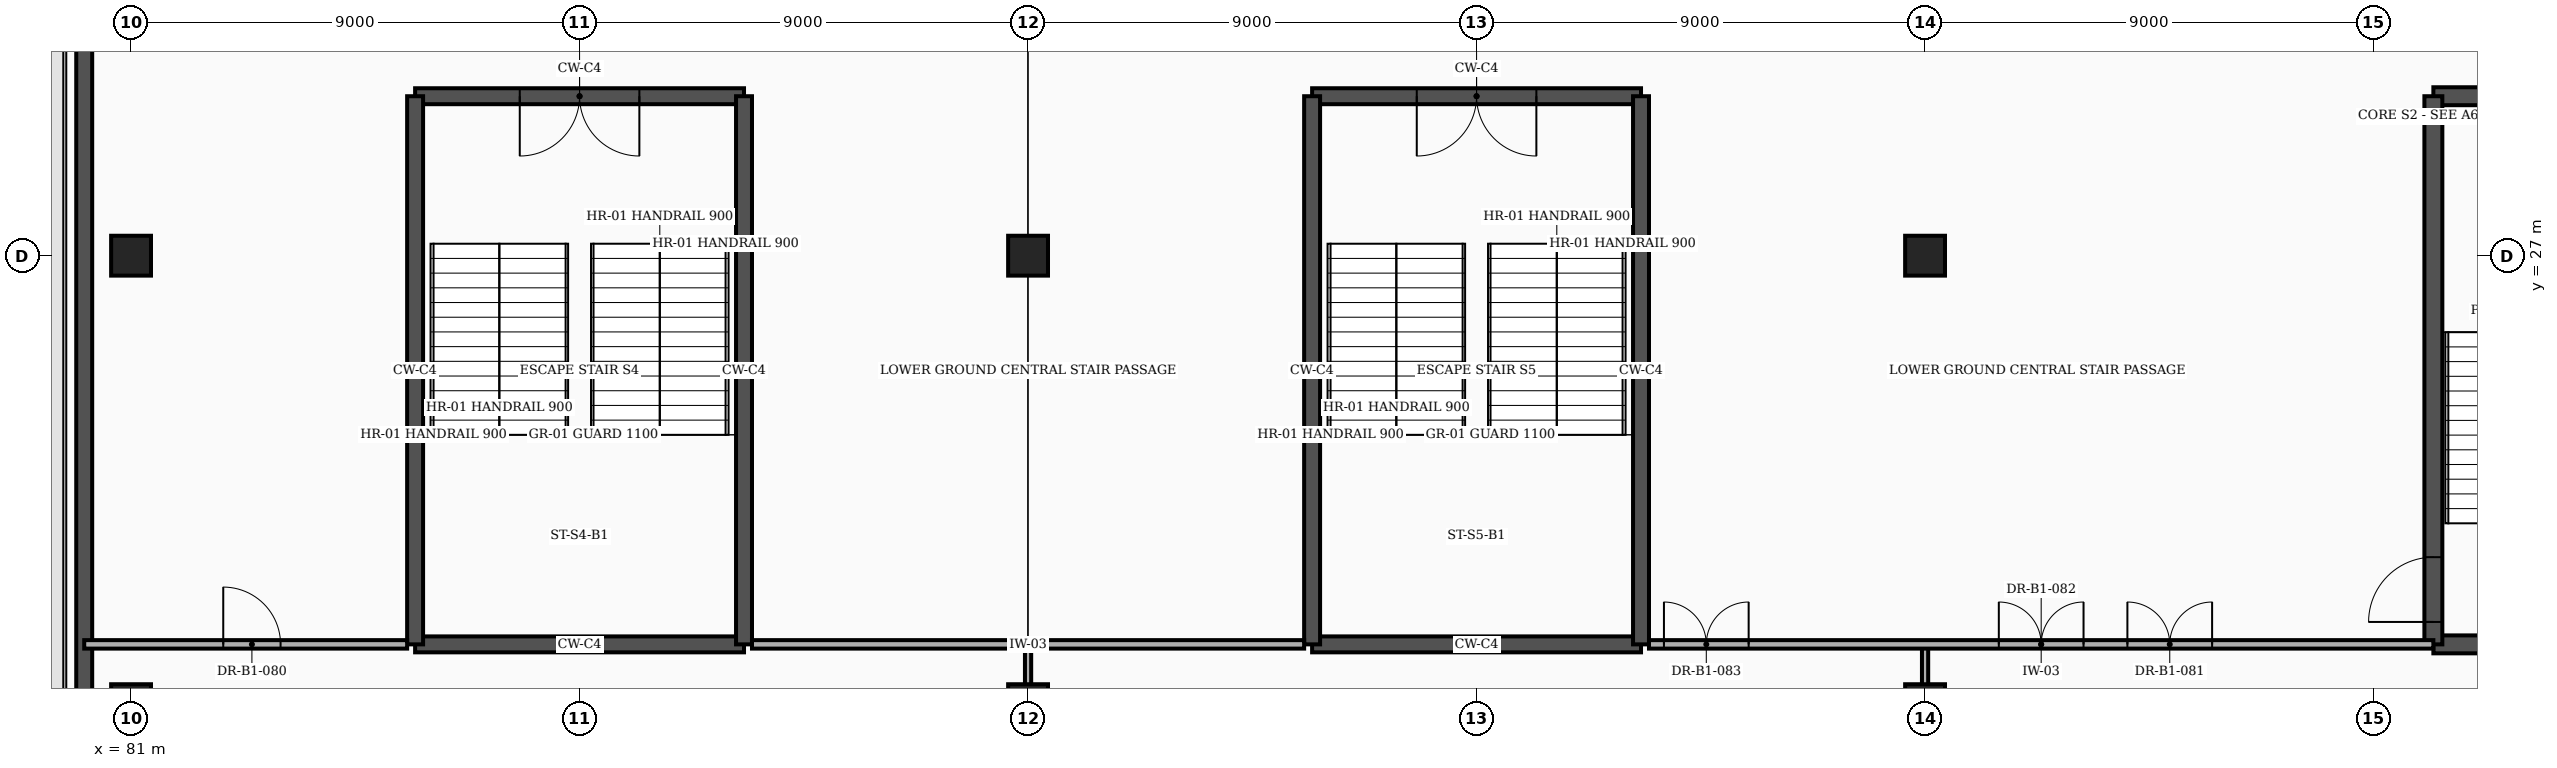
"""IFC4 building model, lengths in metres.
Left out: names, types, materials, properties, quantities, classifications, styles, units other than length and angle.
Written with IfcOpenShell. Run it as: python <this file> out.ifc"""

import sys

from ifc_helpers import new_model, si_unit, direction, frame, frame_2d, origin, origin_2d, place, context, subcontext, project, spatial, rectangle, extrude, element, fill, save


model = new_model("IFC4")
c1 = context("Model", 3, precision=1e-05, world=origin(), true_north=direction((0.0, 1.0)))
c2 = subcontext(c1, "Body", "Model", "MODEL_VIEW")
j1 = project(units=[si_unit("LENGTHUNIT", "METRE"), si_unit("PLANEANGLEUNIT", "RADIAN")], contexts=[c1])
p1 = place(None, origin())
s1 = spatial("IfcSite", under=j1, at=p1, CompositionType="ELEMENT")
p2 = place(p1, origin())
s2 = spatial("IfcBuilding", under=s1, at=p2, CompositionType="ELEMENT")
p3 = place(p2, frame((0.0, 0.0, -4.5)))
s3 = spatial("IfcBuildingStorey", under=s2, at=p3, CompositionType="ELEMENT", Elevation=-4.5)
for number, where, z_axis, x_axis in (
    (1, (81.0, 18.0, -0.45), (0.0, 0.0, 1.0), (1.0, 0.0, 0.0)),
    (2, (81.0, 27.0, -0.45), (0.0, 0.0, 1.0), (1.0, 0.0, 0.0)),
    (3, (99.0, 18.0, -0.45), (0.0, 0.0, 1.0), (1.0, 0.0, 0.0)),
    (4, (99.0, 27.0, -0.45), (0.0, 0.0, 1.0), (1.0, 0.0, 0.0)),
    (5, (117.0, 18.0, -0.45), (0.0, 0.0, 1.0), (1.0, 0.0, 0.0)),
    (6, (117.0, 27.0, -0.45), (0.0, 0.0, 1.0), (1.0, 0.0, 0.0)),
):
    element("IfcColumn", number, at=place(p3, frame(where, z_axis=z_axis, x_axis=x_axis)), inside=s3, PredefinedType="COLUMN", context=c2, shape_type="SweptSolid", body=[
        extrude(rectangle(XDim=0.8, YDim=0.8, at=origin_2d()), origin(), (0.0, 0.0, 1.0), 4.95),
    ])
p4 = place(p3, frame((80.06, 1.34, 0.0), z_axis=(0.0, 0.0, 1.0), x_axis=(0.0, 1.0, 0.0)))
e7 = element("IfcWall", 7, at=p4, inside=s3, PredefinedType="SHEAR", context=c2, shape_type="SweptSolid", body=[
    extrude(rectangle(XDim=31.66, YDim=0.32, at=frame_2d((15.83, 0.0))), origin(), (0.0, 0.0, 1.0), 4.24),
])
p5 = place(p3, frame((127.2, 19.2, 0.0), z_axis=(0.0, 0.0, 1.0), x_axis=(1.0, 0.0, 0.0)))
e8 = element("IfcWall", 8, at=p5, inside=s3, PredefinedType="SHEAR", context=c2, shape_type="SweptSolid", body=[
    extrude(rectangle(XDim=6.6, YDim=0.36, at=frame_2d((3.3, 0.0))), origin(), (0.0, 0.0, 1.0), 4.24),
])
p6 = place(p3, frame((127.2, 30.2, 0.0), z_axis=(0.0, 0.0, 1.0), x_axis=(1.0, 0.0, 0.0)))
e9 = element("IfcWall", 9, at=p6, inside=s3, PredefinedType="SHEAR", context=c2, shape_type="SweptSolid", body=[
    extrude(rectangle(XDim=6.6, YDim=0.36, at=frame_2d((3.3, 0.0))), origin(), (0.0, 0.0, 1.0), 4.24),
])
p7 = place(p6, frame((4.45, 0.0, 0.0)))
e10 = element("IfcOpeningElement", 10, at=p7, cuts=e9, PredefinedType="OPENING", context=c2, shape_type="SweptSolid", body=[
    extrude(rectangle(XDim=1.6, YDim=2.3, at=frame_2d((0.8, 1.15))), frame((0.0, 0.192, 0.0), z_axis=(0.0, -1.0, 0.0), x_axis=(1.0, 0.0, 0.0)), (0.0, 0.0, 1.0), 0.384),
])
p8 = place(p3, frame((127.2, 19.2, 0.0), z_axis=(0.0, 0.0, 1.0), x_axis=(0.0, 1.0, 0.0)))
e11 = element("IfcWall", 11, at=p8, inside=s3, PredefinedType="SHEAR", context=c2, shape_type="SweptSolid", body=[
    extrude(rectangle(XDim=11.0, YDim=0.36, at=frame_2d((5.5, 0.0))), origin(), (0.0, 0.0, 1.0), 4.24),
])
p9 = place(p8, frame((0.45, 0.0, 0.0)))
e12 = element("IfcOpeningElement", 12, at=p9, cuts=e11, PredefinedType="OPENING", context=c2, shape_type="SweptSolid", body=[
    extrude(rectangle(XDim=1.3, YDim=2.2, at=frame_2d((0.65, 1.1))), frame((0.0, 0.192, 0.0), z_axis=(0.0, -1.0, 0.0), x_axis=(1.0, 0.0, 0.0)), (0.0, 0.0, 1.0), 0.384),
])
p10 = place(p3, frame((86.7, 19.2, 0.0), z_axis=(0.0, 0.0, 1.0), x_axis=(1.0, 0.0, 0.0)))
e13 = element("IfcWall", 13, at=p10, inside=s3, PredefinedType="SHEAR", context=c2, shape_type="SweptSolid", body=[
    extrude(rectangle(XDim=6.6, YDim=0.32, at=frame_2d((3.3, 0.0))), origin(), (0.0, 0.0, 1.0), 4.24),
])
p11 = place(p3, frame((86.7, 30.2, 0.0), z_axis=(0.0, 0.0, 1.0), x_axis=(1.0, 0.0, 0.0)))
e14 = element("IfcWall", 14, at=p11, inside=s3, PredefinedType="SHEAR", context=c2, shape_type="SweptSolid", body=[
    extrude(rectangle(XDim=6.6, YDim=0.32, at=frame_2d((3.3, 0.0))), origin(), (0.0, 0.0, 1.0), 4.24),
])
p12 = place(p11, frame((2.1, 0.0, 0.0)))
e15 = element("IfcOpeningElement", 15, at=p12, cuts=e14, PredefinedType="OPENING", context=c2, shape_type="SweptSolid", body=[
    extrude(rectangle(XDim=2.4, YDim=2.25, at=frame_2d((1.2, 1.125))), frame((0.0, 0.172, 0.0), z_axis=(0.0, -1.0, 0.0), x_axis=(1.0, 0.0, 0.0)), (0.0, 0.0, 1.0), 0.344),
])
for number, where, z_axis, x_axis in (
    (16, (86.7, 19.2, 0.0), (0.0, 0.0, 1.0), (0.0, 1.0, 0.0)),
    (17, (93.3, 19.2, 0.0), (0.0, 0.0, 1.0), (0.0, 1.0, 0.0)),
):
    element("IfcWall", number, at=place(p3, frame(where, z_axis=z_axis, x_axis=x_axis)), inside=s3, PredefinedType="SHEAR", context=c2, shape_type="SweptSolid", body=[
        extrude(rectangle(XDim=11.0, YDim=0.32, at=frame_2d((5.5, 0.0))), origin(), (0.0, 0.0, 1.0), 4.24),
    ])
p13 = place(p3, frame((104.7, 19.2, 0.0), z_axis=(0.0, 0.0, 1.0), x_axis=(1.0, 0.0, 0.0)))
e18 = element("IfcWall", 18, at=p13, inside=s3, PredefinedType="SHEAR", context=c2, shape_type="SweptSolid", body=[
    extrude(rectangle(XDim=6.6, YDim=0.32, at=frame_2d((3.3, 0.0))), origin(), (0.0, 0.0, 1.0), 4.24),
])
p14 = place(p3, frame((104.7, 30.2, 0.0), z_axis=(0.0, 0.0, 1.0), x_axis=(1.0, 0.0, 0.0)))
e19 = element("IfcWall", 19, at=p14, inside=s3, PredefinedType="SHEAR", context=c2, shape_type="SweptSolid", body=[
    extrude(rectangle(XDim=6.6, YDim=0.32, at=frame_2d((3.3, 0.0))), origin(), (0.0, 0.0, 1.0), 4.24),
])
p15 = place(p14, frame((2.1, 0.0, 0.0)))
e20 = element("IfcOpeningElement", 20, at=p15, cuts=e19, PredefinedType="OPENING", context=c2, shape_type="SweptSolid", body=[
    extrude(rectangle(XDim=2.4, YDim=2.25, at=frame_2d((1.2, 1.125))), frame((0.0, 0.172, 0.0), z_axis=(0.0, -1.0, 0.0), x_axis=(1.0, 0.0, 0.0)), (0.0, 0.0, 1.0), 0.344),
])
for number, where, z_axis, x_axis in (
    (21, (104.7, 19.2, 0.0), (0.0, 0.0, 1.0), (0.0, 1.0, 0.0)),
    (22, (111.3, 19.2, 0.0), (0.0, 0.0, 1.0), (0.0, 1.0, 0.0)),
):
    element("IfcWall", number, at=place(p3, frame(where, z_axis=z_axis, x_axis=x_axis)), inside=s3, PredefinedType="SHEAR", context=c2, shape_type="SweptSolid", body=[
        extrude(rectangle(XDim=11.0, YDim=0.32, at=frame_2d((5.5, 0.0))), origin(), (0.0, 0.0, 1.0), 4.24),
    ])
for number, where, z_axis, x_axis in (
    (23, (99.0, 0.21, 0.0), (0.0, 0.0, 1.0), (0.0, 1.0, 0.0)),
    (24, (117.0, 0.21, 0.0), (0.0, 0.0, 1.0), (0.0, 1.0, 0.0)),
):
    element("IfcWall", number, at=place(p3, frame(where, z_axis=z_axis, x_axis=x_axis)), inside=s3, PredefinedType="PARTITIONING", context=c2, shape_type="SweptSolid", body=[
        extrude(rectangle(XDim=18.99, YDim=0.125, at=frame_2d((9.495, 0.0))), origin(), (0.0, 0.0, 1.0), 3.628),
    ])
p16 = place(p3, frame((80.06, 19.2, 0.0), z_axis=(0.0, 0.0, 1.0), x_axis=(1.0, 0.0, 0.0)))
e25 = element("IfcWall", 25, at=p16, inside=s3, PredefinedType="PARTITIONING", context=c2, shape_type="SweptSolid", body=[
    extrude(rectangle(XDim=6.48, YDim=0.17, at=frame_2d((3.24, 0.0))), origin(), (0.0, 0.0, 1.0), 4.24),
])
p17 = place(p16, frame((2.79, 0.0, 0.0)))
e26 = element("IfcOpeningElement", 26, at=p17, cuts=e25, PredefinedType="OPENING", context=c2, shape_type="SweptSolid", body=[
    extrude(rectangle(XDim=1.15, YDim=2.15, at=frame_2d((0.575, 1.075))), frame((0.0, 0.097, 0.0), z_axis=(0.0, -1.0, 0.0), x_axis=(1.0, 0.0, 0.0)), (0.0, 0.0, 1.0), 0.194),
])
p18 = place(p3, frame((93.46, 19.2, 0.0), z_axis=(0.0, 0.0, 1.0), x_axis=(1.0, 0.0, 0.0)))
e27 = element("IfcWall", 27, at=p18, inside=s3, PredefinedType="PARTITIONING", context=c2, shape_type="SweptSolid", body=[
    extrude(rectangle(XDim=11.08, YDim=0.17, at=frame_2d((5.54, 0.0))), origin(), (0.0, 0.0, 1.0), 4.24),
])
p19 = place(p3, frame((111.46, 19.2, 0.0), z_axis=(0.0, 0.0, 1.0), x_axis=(1.0, 0.0, 0.0)))
e28 = element("IfcWall", 28, at=p19, inside=s3, PredefinedType="PARTITIONING", context=c2, shape_type="SweptSolid", body=[
    extrude(rectangle(XDim=15.74, YDim=0.17, at=frame_2d((7.87, 0.0))), origin(), (0.0, 0.0, 1.0), 4.24),
])
p20 = place(p19, frame((9.6, 0.0, 0.0)))
e29 = element("IfcOpeningElement", 29, at=p20, cuts=e28, PredefinedType="OPENING", context=c2, shape_type="SweptSolid", body=[
    extrude(rectangle(XDim=1.7, YDim=2.3, at=frame_2d((0.85, 1.15))), frame((0.0, 0.097, 0.0), z_axis=(0.0, -1.0, 0.0), x_axis=(1.0, 0.0, 0.0)), (0.0, 0.0, 1.0), 0.194),
])
p21 = place(p19, frame((7.02, 0.0, 0.0)))
e30 = element("IfcOpeningElement", 30, at=p21, cuts=e28, PredefinedType="OPENING", context=c2, shape_type="SweptSolid", body=[
    extrude(rectangle(XDim=1.7, YDim=2.3, at=frame_2d((0.85, 1.15))), frame((0.0, 0.097, 0.0), z_axis=(0.0, -1.0, 0.0), x_axis=(1.0, 0.0, 0.0)), (0.0, 0.0, 1.0), 0.194),
])
p22 = place(p19, frame((0.3, 0.0, 0.0)))
e31 = element("IfcOpeningElement", 31, at=p22, cuts=e28, PredefinedType="OPENING", context=c2, shape_type="SweptSolid", body=[
    extrude(rectangle(XDim=1.7, YDim=2.3, at=frame_2d((0.85, 1.15))), frame((0.0, 0.097, 0.0), z_axis=(0.0, -1.0, 0.0), x_axis=(1.0, 0.0, 0.0)), (0.0, 0.0, 1.0), 0.194),
])
p23 = place(p9, origin())
e32 = element("IfcDoor", 32, at=p23, inside=s3, OperationType="SINGLE_SWING_LEFT", PredefinedType="DOOR", context=c2, shape_type="SweptSolid", body=[
    extrude(rectangle(XDim=1.3, YDim=2.2, at=frame_2d((0.65, 1.1))), frame((0.0, 0.025, 0.0), z_axis=(0.0, -1.0, 0.0), x_axis=(1.0, 0.0, 0.0)), (0.0, 0.0, 1.0), 0.05),
])
fill(e12, e32)
p24 = place(p12, frame((2.4, 0.0, 0.0), z_axis=(0.0, 0.0, 1.0), x_axis=(-1.0, 0.0, 0.0)))
e33 = element("IfcDoor", 33, at=p24, inside=s3, OperationType="DOUBLE_DOOR_SINGLE_SWING", PredefinedType="DOOR", context=c2, shape_type="SweptSolid", body=[
    extrude(rectangle(XDim=2.4, YDim=2.25, at=frame_2d((1.2, 1.125))), frame((0.0, 0.025, 0.0), z_axis=(0.0, -1.0, 0.0), x_axis=(1.0, 0.0, 0.0)), (0.0, 0.0, 1.0), 0.05),
])
fill(e15, e33)
p25 = place(p15, frame((2.4, 0.0, 0.0), z_axis=(0.0, 0.0, 1.0), x_axis=(-1.0, 0.0, 0.0)))
e34 = element("IfcDoor", 34, at=p25, inside=s3, OperationType="DOUBLE_DOOR_SINGLE_SWING", PredefinedType="DOOR", context=c2, shape_type="SweptSolid", body=[
    extrude(rectangle(XDim=2.4, YDim=2.25, at=frame_2d((1.2, 1.125))), frame((0.0, 0.025, 0.0), z_axis=(0.0, -1.0, 0.0), x_axis=(1.0, 0.0, 0.0)), (0.0, 0.0, 1.0), 0.05),
])
fill(e20, e34)
p26 = place(p17, origin())
e35 = element("IfcDoor", 35, at=p26, inside=s3, OperationType="SINGLE_SWING_LEFT", PredefinedType="DOOR", context=c2, shape_type="SweptSolid", body=[
    extrude(rectangle(XDim=1.15, YDim=2.15, at=frame_2d((0.575, 1.075))), frame((0.0, 0.025, 0.0), z_axis=(0.0, -1.0, 0.0), x_axis=(1.0, 0.0, 0.0)), (0.0, 0.0, 1.0), 0.05),
])
fill(e26, e35)
p27 = place(p20, origin())
e36 = element("IfcDoor", 36, at=p27, inside=s3, OperationType="DOUBLE_DOOR_SINGLE_SWING", PredefinedType="DOOR", context=c2, shape_type="SweptSolid", body=[
    extrude(rectangle(XDim=1.7, YDim=2.3, at=frame_2d((0.85, 1.15))), frame((0.0, 0.025, 0.0), z_axis=(0.0, -1.0, 0.0), x_axis=(1.0, 0.0, 0.0)), (0.0, 0.0, 1.0), 0.05),
])
fill(e29, e36)
p28 = place(p21, origin())
e37 = element("IfcDoor", 37, at=p28, inside=s3, OperationType="DOUBLE_DOOR_SINGLE_SWING", PredefinedType="DOOR", context=c2, shape_type="SweptSolid", body=[
    extrude(rectangle(XDim=1.7, YDim=2.3, at=frame_2d((0.85, 1.15))), frame((0.0, 0.025, 0.0), z_axis=(0.0, -1.0, 0.0), x_axis=(1.0, 0.0, 0.0)), (0.0, 0.0, 1.0), 0.05),
])
fill(e30, e37)
p29 = place(p22, origin())
e38 = element("IfcDoor", 38, at=p29, inside=s3, OperationType="DOUBLE_DOOR_SINGLE_SWING", PredefinedType="DOOR", context=c2, shape_type="SweptSolid", body=[
    extrude(rectangle(XDim=1.7, YDim=2.3, at=frame_2d((0.85, 1.15))), frame((0.0, 0.025, 0.0), z_axis=(0.0, -1.0, 0.0), x_axis=(1.0, 0.0, 0.0)), (0.0, 0.0, 1.0), 0.05),
])
fill(e31, e38)
save(model, sys.argv[1])
